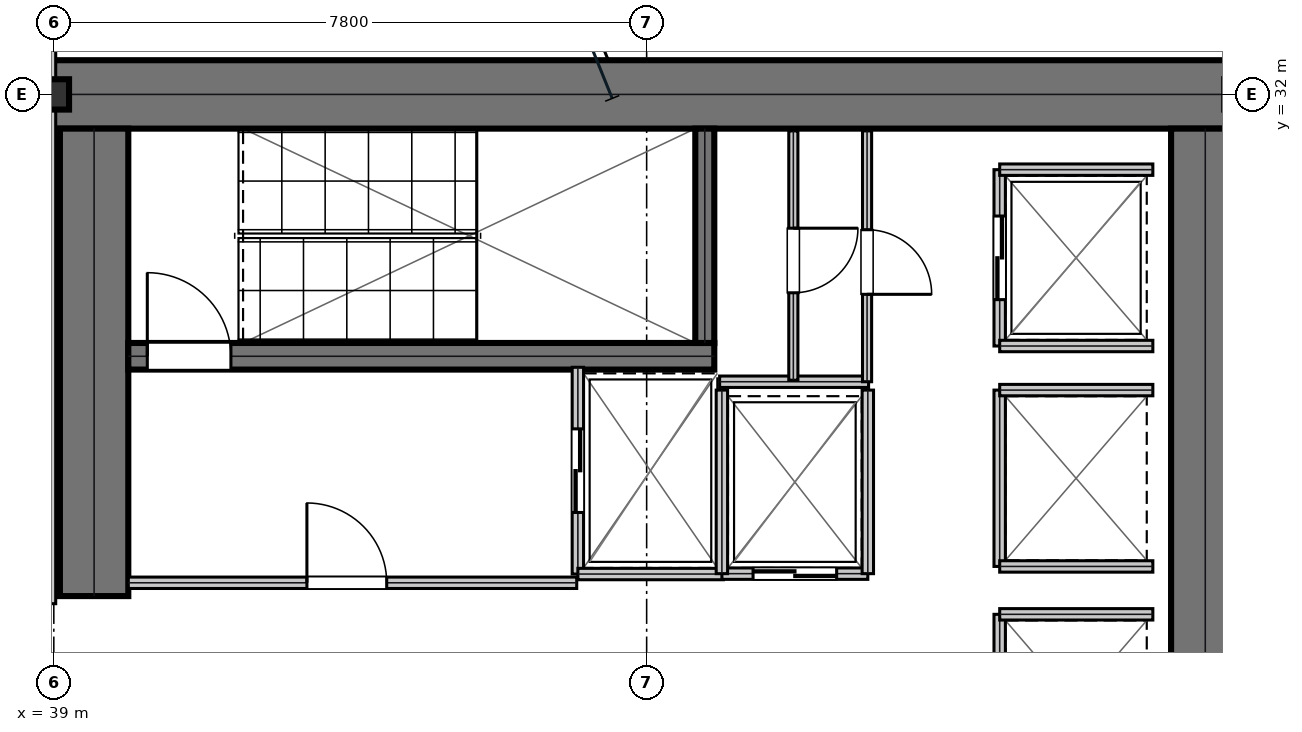
"""IFC4 building model, lengths in metres.
Left out: names, types, materials, properties, quantities, classifications, styles, units other than length and angle.
Written with IfcOpenShell. Run it as: python <this file> out.ifc"""

import sys

from ifc_helpers import new_model, si_unit, direction, frame, frame_2d, origin, origin_2d, place, context, subcontext, project, spatial, rectangle, i_section, extrude, element, fill, save


model = new_model("IFC4")
c1 = context("Model", 3, precision=1e-05, world=origin(), true_north=direction((0.0, 1.0)))
c2 = subcontext(c1, "Body", "Model", "MODEL_VIEW")
j1 = project(units=[si_unit("LENGTHUNIT", "METRE"), si_unit("PLANEANGLEUNIT", "RADIAN")], contexts=[c1])
p1 = place(None, origin())
s1 = spatial("IfcSite", under=j1, at=p1, CompositionType="ELEMENT")
p2 = place(p1, origin())
s2 = spatial("IfcBuilding", under=s1, at=p2, CompositionType="ELEMENT")
p3 = place(p2, frame((0.0, 0.0, 66.15)))
s3 = spatial("IfcBuildingStorey", under=s2, at=p3, CompositionType="ELEMENT", Elevation=66.15)
p4 = place(p3, frame((38.8, 32.0, 0.0), z_axis=(0.0, 0.0, 1.0), x_axis=(1.0, 0.0, 0.0)))
e1 = element("IfcWall", 1, at=p4, inside=s3, PredefinedType="SHEAR", context=c2, shape_type="SweptSolid", body=[
    extrude(rectangle(XDim=16.0, YDim=0.9, at=frame_2d((8.0, 0.0))), origin(), (0.0, 0.0, 1.0), 3.81),
])
p5 = place(p3, frame((39.53, 25.4, 0.0), z_axis=(0.0, 0.0, 1.0), x_axis=(0.0, 1.0, 0.0)))
e2 = element("IfcWall", 2, at=p5, inside=s3, PredefinedType="SHEAR", context=c2, shape_type="SweptSolid", body=[
    extrude(rectangle(XDim=6.15, YDim=0.9, at=frame_2d((3.075, 0.0))), origin(), (0.0, 0.0, 1.0), 3.81),
])
p6 = place(p3, frame((54.15, 16.45, 0.0), z_axis=(0.0, 0.0, 1.0), x_axis=(0.0, 1.0, 0.0)))
e3 = element("IfcWall", 3, at=p6, inside=s3, PredefinedType="SHEAR", context=c2, shape_type="SweptSolid", body=[
    extrude(rectangle(XDim=15.1, YDim=0.9, at=frame_2d((7.55, 0.0))), origin(), (0.0, 0.0, 1.0), 3.81),
])
p7 = place(p3, frame((39.98, 28.555, 0.0), z_axis=(0.0, 0.0, 1.0), x_axis=(1.0, 0.0, 0.0)))
e4 = element("IfcWall", 4, at=p7, inside=s3, PredefinedType="SHEAR", context=c2, shape_type="SweptSolid", body=[
    extrude(rectangle(XDim=7.71, YDim=0.35, at=frame_2d((3.855, 0.0))), origin(), (0.0, 0.0, 1.0), 3.81),
])
p8 = place(p7, frame((0.25, 0.0, 0.0)))
e5 = element("IfcOpeningElement", 5, at=p8, cuts=e4, PredefinedType="OPENING", context=c2, shape_type="SweptSolid", body=[
    extrude(rectangle(XDim=1.1, YDim=2.15, at=frame_2d((0.55, 1.075))), frame((0.0, 0.185, 0.0), z_axis=(0.0, -1.0, 0.0), x_axis=(1.0, 0.0, 0.0)), (0.0, 0.0, 1.0), 0.37),
])
p9 = place(p3, frame((47.565, 28.73, 0.0), z_axis=(0.0, 0.0, 1.0), x_axis=(0.0, 1.0, 0.0)))
e6 = element("IfcWall", 6, at=p9, inside=s3, PredefinedType="SHEAR", context=c2, shape_type="SweptSolid", body=[
    extrude(rectangle(XDim=2.82, YDim=0.25, at=frame_2d((1.41, 0.0))), origin(), (0.0, 0.0, 1.0), 3.81),
])
p10 = place(p3, frame((39.0, 32.0, 0.0), z_axis=(0.0, 0.0, 1.0), x_axis=(1.0, 0.0, 0.0)))
e7 = element("IfcColumn", 7, at=p10, inside=s3, PredefinedType="COLUMN", context=c2, shape_type="SweptSolid", body=[
    extrude(i_section(OverallWidth=0.401, OverallDepth=0.399, WebThickness=0.025, FlangeThickness=0.04, at=origin_2d()), origin(), (0.0, 0.0, 1.0), 4.044),
])
p11 = place(p3, frame((39.98, 25.575, 0.0), z_axis=(0.0, 0.0, 1.0), x_axis=(1.0, 0.0, 0.0)))
e8 = element("IfcWall", 8, at=p11, inside=s3, PredefinedType="PARTITIONING", context=c2, shape_type="SweptSolid", body=[
    extrude(rectangle(XDim=5.9, YDim=0.15, at=frame_2d((2.95, 0.0))), origin(), (0.0, 0.0, 1.0), 3.81),
])
p12 = place(p11, frame((2.35, 0.0, 0.0)))
e9 = element("IfcOpeningElement", 9, at=p12, cuts=e8, PredefinedType="OPENING", context=c2, shape_type="SweptSolid", body=[
    extrude(rectangle(XDim=1.05, YDim=2.15, at=frame_2d((0.525, 1.075))), frame((0.0, 0.085, 0.0), z_axis=(0.0, -1.0, 0.0), x_axis=(1.0, 0.0, 0.0)), (0.0, 0.0, 1.0), 0.17),
])
p13 = place(p3, frame((45.895, 25.69, 0.0), z_axis=(0.0, 0.0, 1.0), x_axis=(0.0, 1.0, 0.0)))
e10 = element("IfcWall", 10, at=p13, inside=s3, PredefinedType="PARTITIONING", context=c2, shape_type="SweptSolid", body=[
    extrude(rectangle(XDim=2.72, YDim=0.15, at=frame_2d((1.36, 0.0))), origin(), (0.0, 0.0, 1.0), 3.81),
])
p14 = place(p13, frame((0.81, 0.0, 0.0)))
e11 = element("IfcOpeningElement", 11, at=p14, cuts=e10, PredefinedType="OPENING", context=c2, shape_type="SweptSolid", body=[
    extrude(rectangle(XDim=1.1, YDim=2.15, at=frame_2d((0.55, 1.075))), frame((0.0, 0.085, 0.0), z_axis=(0.0, -1.0, 0.0), x_axis=(1.0, 0.0, 0.0)), (0.0, 0.0, 1.0), 0.17),
])
p15 = place(p3, frame((45.895, 25.69, 0.0), z_axis=(0.0, 0.0, 1.0), x_axis=(1.0, 0.0, 0.0)))
e12 = element("IfcWall", 12, at=p15, inside=s3, PredefinedType="PARTITIONING", context=c2, shape_type="SweptSolid", body=[
    extrude(rectangle(XDim=1.915, YDim=0.15, at=frame_2d((0.958, 0.0))), origin(), (0.0, 0.0, 1.0), 3.81),
])
p16 = place(p3, frame((47.79, 25.695, 0.0), z_axis=(0.0, 0.0, 1.0), x_axis=(1.0, 0.0, 0.0)))
e13 = element("IfcWall", 13, at=p16, inside=s3, PredefinedType="PARTITIONING", context=c2, shape_type="SweptSolid", body=[
    extrude(rectangle(XDim=1.92, YDim=0.15, at=frame_2d((0.96, 0.0))), origin(), (0.0, 0.0, 1.0), 3.81),
])
p17 = place(p16, frame((0.41, 0.0, 0.0)))
e14 = element("IfcOpeningElement", 14, at=p17, cuts=e13, PredefinedType="OPENING", context=c2, shape_type="SweptSolid", body=[
    extrude(rectangle(XDim=1.1, YDim=2.15, at=frame_2d((0.55, 1.075))), frame((0.0, 0.085, 0.0), z_axis=(0.0, -1.0, 0.0), x_axis=(1.0, 0.0, 0.0)), (0.0, 0.0, 1.0), 0.17),
])
for number, where, z_axis, x_axis in (
    (15, (47.79, 25.695, 0.0), (0.0, 0.0, 1.0), (0.0, 1.0, 0.0)),
    (16, (49.71, 25.695, 0.0), (0.0, 0.0, 1.0), (0.0, 1.0, 0.0)),
):
    element("IfcWall", number, at=place(p3, frame(where, z_axis=z_axis, x_axis=x_axis)), inside=s3, PredefinedType="PARTITIONING", context=c2, shape_type="SweptSolid", body=[
        extrude(rectangle(XDim=2.415, YDim=0.15, at=frame_2d((1.208, 0.0))), origin(), (0.0, 0.0, 1.0), 3.81),
    ])
p18 = place(p3, frame((51.445, 28.69, 0.0), z_axis=(0.0, 0.0, 1.0), x_axis=(0.0, 1.0, 0.0)))
e17 = element("IfcWall", 17, at=p18, inside=s3, PredefinedType="PARTITIONING", context=c2, shape_type="SweptSolid", body=[
    extrude(rectangle(XDim=2.32, YDim=0.15, at=frame_2d((1.16, 0.0))), origin(), (0.0, 0.0, 1.0), 3.81),
])
p19 = place(p18, frame((0.61, 0.0, 0.0)))
e18 = element("IfcOpeningElement", 18, at=p19, cuts=e17, PredefinedType="OPENING", context=c2, shape_type="SweptSolid", body=[
    extrude(rectangle(XDim=1.1, YDim=2.15, at=frame_2d((0.55, 1.075))), frame((0.0, 0.085, 0.0), z_axis=(0.0, -1.0, 0.0), x_axis=(1.0, 0.0, 0.0)), (0.0, 0.0, 1.0), 0.17),
])
for number, where, z_axis, x_axis in (
    (19, (51.445, 28.69, 0.0), (0.0, 0.0, 1.0), (1.0, 0.0, 0.0)),
    (20, (51.445, 31.01, 0.0), (0.0, 0.0, 1.0), (1.0, 0.0, 0.0)),
):
    element("IfcWall", number, at=place(p3, frame(where, z_axis=z_axis, x_axis=x_axis)), inside=s3, PredefinedType="PARTITIONING", context=c2, shape_type="SweptSolid", body=[
        extrude(rectangle(XDim=2.015, YDim=0.15, at=frame_2d((1.007, 0.0))), origin(), (0.0, 0.0, 1.0), 3.81),
    ])
p20 = place(p3, frame((51.445, 25.79, 0.0), z_axis=(0.0, 0.0, 1.0), x_axis=(0.0, 1.0, 0.0)))
e21 = element("IfcWall", 21, at=p20, inside=s3, PredefinedType="PARTITIONING", context=c2, shape_type="SweptSolid", body=[
    extrude(rectangle(XDim=2.32, YDim=0.15, at=frame_2d((1.16, 0.0))), origin(), (0.0, 0.0, 1.0), 3.81),
])
for number, where, z_axis, x_axis in (
    (22, (51.445, 25.79, 0.0), (0.0, 0.0, 1.0), (1.0, 0.0, 0.0)),
    (23, (51.445, 28.11, 0.0), (0.0, 0.0, 1.0), (1.0, 0.0, 0.0)),
):
    element("IfcWall", number, at=place(p3, frame(where, z_axis=z_axis, x_axis=x_axis)), inside=s3, PredefinedType="PARTITIONING", context=c2, shape_type="SweptSolid", body=[
        extrude(rectangle(XDim=2.015, YDim=0.15, at=frame_2d((1.007, 0.0))), origin(), (0.0, 0.0, 1.0), 3.81),
    ])
p21 = place(p3, frame((51.445, 22.84, 0.0), z_axis=(0.0, 0.0, 1.0), x_axis=(0.0, 1.0, 0.0)))
e24 = element("IfcWall", 24, at=p21, inside=s3, PredefinedType="PARTITIONING", context=c2, shape_type="SweptSolid", body=[
    extrude(rectangle(XDim=2.32, YDim=0.15, at=frame_2d((1.16, 0.0))), origin(), (0.0, 0.0, 1.0), 3.81),
])
p22 = place(p3, frame((51.445, 25.16, 0.0), z_axis=(0.0, 0.0, 1.0), x_axis=(1.0, 0.0, 0.0)))
e25 = element("IfcWall", 25, at=p22, inside=s3, PredefinedType="PARTITIONING", context=c2, shape_type="SweptSolid", body=[
    extrude(rectangle(XDim=2.015, YDim=0.15, at=frame_2d((1.007, 0.0))), origin(), (0.0, 0.0, 1.0), 3.81),
])
p23 = place(p3, frame((47.76, 28.22, 0.0), z_axis=(0.0, 0.0, 1.0), x_axis=(1.0, 0.0, 0.0)))
e26 = element("IfcWall", 26, at=p23, inside=s3, PredefinedType="PARTITIONING", context=c2, shape_type="SweptSolid", body=[
    extrude(rectangle(XDim=1.96, YDim=0.15, at=frame_2d((0.98, 0.0))), origin(), (0.0, 0.0, 1.0), 3.81),
])
p24 = place(p3, frame((48.73, 28.24, 0.0), z_axis=(0.0, 0.0, 1.0), x_axis=(0.0, 1.0, 0.0)))
e27 = element("IfcWall", 27, at=p24, inside=s3, PredefinedType="PARTITIONING", context=c2, shape_type="SweptSolid", body=[
    extrude(rectangle(XDim=3.28, YDim=0.12, at=frame_2d((1.64, 0.0))), origin(), (0.0, 0.0, 1.0), 3.81),
])
p25 = place(p24, frame((1.15, 0.0, 0.0)))
e28 = element("IfcOpeningElement", 28, at=p25, cuts=e27, PredefinedType="OPENING", context=c2, shape_type="SweptSolid", body=[
    extrude(rectangle(XDim=0.85, YDim=2.15, at=frame_2d((0.425, 1.075))), frame((0.0, 0.07, 0.0), z_axis=(0.0, -1.0, 0.0), x_axis=(1.0, 0.0, 0.0)), (0.0, 0.0, 1.0), 0.14),
])
p26 = place(p3, frame((49.7, 28.22, 0.0), z_axis=(0.0, 0.0, 1.0), x_axis=(0.0, 1.0, 0.0)))
e29 = element("IfcWall", 29, at=p26, inside=s3, PredefinedType="PARTITIONING", context=c2, shape_type="SweptSolid", body=[
    extrude(rectangle(XDim=3.3, YDim=0.12, at=frame_2d((1.65, 0.0))), origin(), (0.0, 0.0, 1.0), 3.81),
])
p27 = place(p26, frame((1.15, 0.0, 0.0)))
e30 = element("IfcOpeningElement", 30, at=p27, cuts=e29, PredefinedType="OPENING", context=c2, shape_type="SweptSolid", body=[
    extrude(rectangle(XDim=0.85, YDim=2.15, at=frame_2d((0.425, 1.075))), frame((0.0, 0.07, 0.0), z_axis=(0.0, -1.0, 0.0), x_axis=(1.0, 0.0, 0.0)), (0.0, 0.0, 1.0), 0.14),
])
p28 = place(p3, frame((38.95, 25.3, 0.0), z_axis=(0.0, 0.0, 1.0), x_axis=(0.0, 1.0, 0.0)))
e31 = element("IfcWall", 31, at=p28, inside=s3, PredefinedType="PARTITIONING", context=c2, shape_type="SweptSolid", body=[
    extrude(rectangle(XDim=8.2, YDim=0.15, at=frame_2d((4.1, 0.0))), origin(), (0.0, 0.0, 1.0), 3.181),
])
p29 = place(p12, origin())
e32 = element("IfcDoor", 32, at=p29, inside=s3, OperationType="SINGLE_SWING_LEFT", PredefinedType="DOOR", context=c2, shape_type="SweptSolid", body=[
    extrude(rectangle(XDim=1.05, YDim=2.15, at=frame_2d((0.525, 1.075))), frame((0.0, 0.025, 0.0), z_axis=(0.0, -1.0, 0.0), x_axis=(1.0, 0.0, 0.0)), (0.0, 0.0, 1.0), 0.05),
])
fill(e9, e32)
p30 = place(p14, frame((1.1, 0.0, 0.0), z_axis=(0.0, 0.0, 1.0), x_axis=(-1.0, 0.0, 0.0)))
e33 = element("IfcDoor", 33, at=p30, inside=s3, OperationType="DOUBLE_DOOR_SLIDING", PredefinedType="DOOR", context=c2, shape_type="SweptSolid", body=[
    extrude(rectangle(XDim=1.1, YDim=2.15, at=frame_2d((0.55, 1.075))), frame((0.0, 0.025, 0.0), z_axis=(0.0, -1.0, 0.0), x_axis=(1.0, 0.0, 0.0)), (0.0, 0.0, 1.0), 0.05),
])
fill(e11, e33)
p31 = place(p17, frame((1.1, 0.0, 0.0), z_axis=(0.0, 0.0, 1.0), x_axis=(-1.0, 0.0, 0.0)))
e34 = element("IfcDoor", 34, at=p31, inside=s3, OperationType="DOUBLE_DOOR_SLIDING", PredefinedType="DOOR", context=c2, shape_type="SweptSolid", body=[
    extrude(rectangle(XDim=1.1, YDim=2.15, at=frame_2d((0.55, 1.075))), frame((0.0, 0.025, 0.0), z_axis=(0.0, -1.0, 0.0), x_axis=(1.0, 0.0, 0.0)), (0.0, 0.0, 1.0), 0.05),
])
fill(e14, e34)
p32 = place(p19, frame((1.1, 0.0, 0.0), z_axis=(0.0, 0.0, 1.0), x_axis=(-1.0, 0.0, 0.0)))
e35 = element("IfcDoor", 35, at=p32, inside=s3, OperationType="DOUBLE_DOOR_SLIDING", PredefinedType="DOOR", context=c2, shape_type="SweptSolid", body=[
    extrude(rectangle(XDim=1.1, YDim=2.15, at=frame_2d((0.55, 1.075))), frame((0.0, 0.025, 0.0), z_axis=(0.0, -1.0, 0.0), x_axis=(1.0, 0.0, 0.0)), (0.0, 0.0, 1.0), 0.05),
])
fill(e18, e35)
p33 = place(p25, frame((0.85, 0.0, 0.0), z_axis=(0.0, 0.0, 1.0), x_axis=(-1.0, 0.0, 0.0)))
e36 = element("IfcDoor", 36, at=p33, inside=s3, OperationType="SINGLE_SWING_LEFT", PredefinedType="DOOR", context=c2, shape_type="SweptSolid", body=[
    extrude(rectangle(XDim=0.85, YDim=2.15, at=frame_2d((0.425, 1.075))), frame((0.0, 0.025, 0.0), z_axis=(0.0, -1.0, 0.0), x_axis=(1.0, 0.0, 0.0)), (0.0, 0.0, 1.0), 0.05),
])
fill(e28, e36)
p34 = place(p27, frame((0.85, 0.0, 0.0), z_axis=(0.0, 0.0, 1.0), x_axis=(-1.0, 0.0, 0.0)))
e37 = element("IfcDoor", 37, at=p34, inside=s3, OperationType="SINGLE_SWING_RIGHT", PredefinedType="DOOR", context=c2, shape_type="SweptSolid", body=[
    extrude(rectangle(XDim=0.85, YDim=2.15, at=frame_2d((0.425, 1.075))), frame((0.0, 0.025, 0.0), z_axis=(0.0, -1.0, 0.0), x_axis=(1.0, 0.0, 0.0)), (0.0, 0.0, 1.0), 0.05),
])
fill(e30, e37)
p35 = place(p8, origin())
e38 = element("IfcDoor", 38, at=p35, inside=s3, OperationType="SINGLE_SWING_LEFT", PredefinedType="DOOR", context=c2, shape_type="SweptSolid", body=[
    extrude(rectangle(XDim=1.1, YDim=2.15, at=frame_2d((0.55, 1.075))), frame((0.0, 0.025, 0.0), z_axis=(0.0, -1.0, 0.0), x_axis=(1.0, 0.0, 0.0)), (0.0, 0.0, 1.0), 0.05),
])
fill(e5, e38)
save(model, sys.argv[1])
